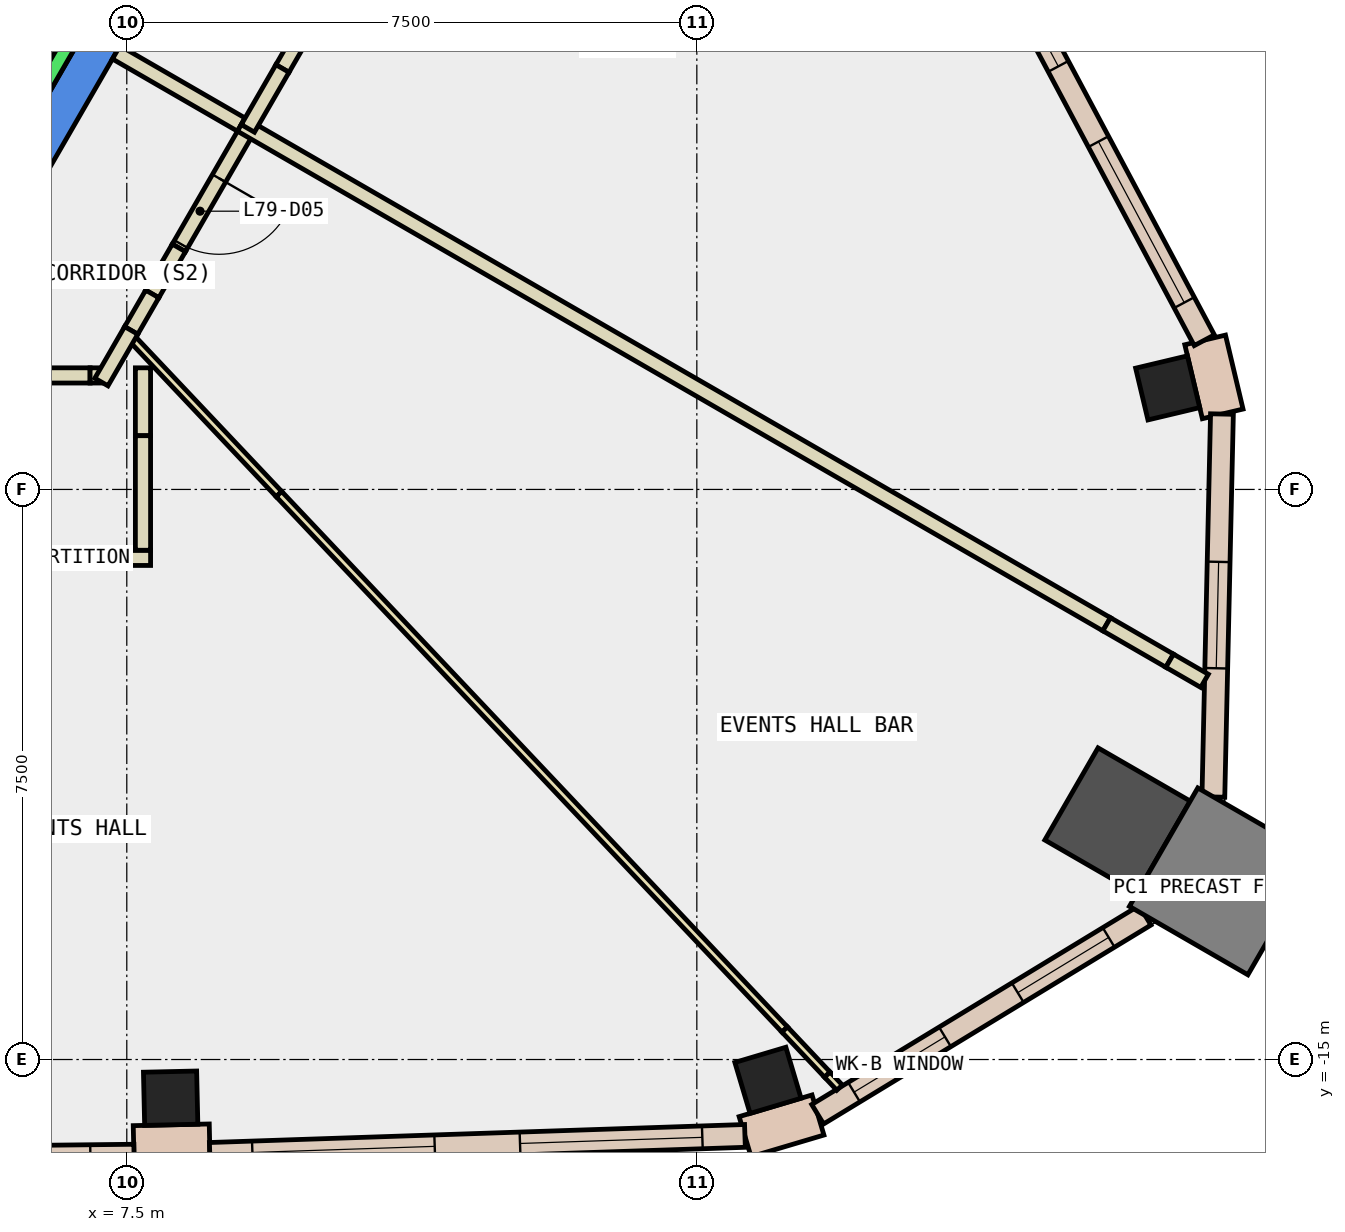
"""IFC4 building model, lengths in metres.
Left out: names, types, materials, properties, quantities, classifications, styles, units other than length and angle.
Written with IfcOpenShell. Run it as: python <this file> out.ifc"""

import sys

from ifc_helpers import new_model, si_unit, direction, frame, frame_2d, origin, origin_2d, place, context, subcontext, project, spatial, polyline, rectangle, outline, extrude, element, fill, save


model = new_model("IFC4")
c1 = context("Model", 3, precision=1e-05, world=origin(), true_north=direction((0.0, 1.0)))
c2 = subcontext(c1, "Body", "Model", "MODEL_VIEW")
j1 = project(units=[si_unit("LENGTHUNIT", "METRE"), si_unit("PLANEANGLEUNIT", "RADIAN")], contexts=[c1])
p1 = place(None, origin())
s1 = spatial("IfcSite", under=j1, at=p1, CompositionType="ELEMENT")
p2 = place(p1, origin())
s2 = spatial("IfcBuilding", under=s1, at=p2, CompositionType="ELEMENT")
p3 = place(p2, frame((0.0, 0.0, 335.9)))
s3 = spatial("IfcBuildingStorey", under=s2, at=p3, CompositionType="ELEMENT", Elevation=335.9)
for number, where, z_axis, x_axis in (
    (1, (8.077, -15.509, -0.35), (0.0, 0.0, 1.0), (1.0, 0.022, 0.0)),
    (2, (15.936, -15.274, -0.35), (0.0, 0.0, 1.0), (0.958, 0.286, 0.0)),
):
    element("IfcColumn", number, at=place(p3, frame(where, z_axis=z_axis, x_axis=x_axis)), inside=s3, PredefinedType="COLUMN", context=c2, shape_type="SweptSolid", body=[
        extrude(rectangle(XDim=0.7, YDim=0.7, at=origin_2d()), origin(), (0.0, 0.0, 1.0), 4.4),
    ])
p4 = place(p3, frame((20.535, -11.856, -0.35), z_axis=(0.0, 0.0, 1.0), x_axis=(-0.866025403784, 0.5, 0.0)))
e3 = element("IfcColumn", 3, at=p4, inside=s3, PredefinedType="COLUMN", context=c2, shape_type="SweptSolid", body=[
    extrude(rectangle(XDim=1.4, YDim=1.4, at=origin_2d()), origin(), (0.0, 0.0, 1.0), 4.4),
])
p5 = place(p3, frame((21.195, -6.164, -0.35), z_axis=(0.0, 0.0, 1.0), x_axis=(-0.2316120761, 0.972808226839, 0.0)))
e4 = element("IfcColumn", 4, at=p5, inside=s3, PredefinedType="COLUMN", context=c2, shape_type="SweptSolid", body=[
    extrude(rectangle(XDim=0.7, YDim=0.7, at=origin_2d()), origin(), (0.0, 0.0, 1.0), 4.4),
])
p6 = place(p3, frame((21.921, -12.656, -0.35), z_axis=(0.0, 0.0, 1.0), x_axis=(-0.866025403784, 0.5, 0.0)))
e5 = element("IfcColumn", 5, at=p6, inside=s3, PredefinedType="COLUMN", context=c2, shape_type="SweptSolid", body=[
    extrude(rectangle(XDim=1.8, YDim=1.8, at=origin_2d()), origin(), (0.0, 0.0, 1.0), 4.4),
])
p7 = place(p3, frame((0.0, 0.0, -0.35)))
e6 = element("IfcWall", 6, at=p7, inside=s3, PredefinedType="SHEAR", context=c2, shape_type="SweptSolid", body=[
    extrude(outline(polyline([(4.907, -6.0), (9.815, 2.5), (9.238, 2.5), (4.619, -5.5), (4.907, -6.0)])), origin(), (0.0, 0.0, 1.0), 4.4),
])
for number, where, z_axis, x_axis in (
    (7, (21.919, -6.506, 0.0), (0.0, 0.0, 1.0), (-0.231, 0.973, 0.0)),
    (8, (7.591, -16.145, 0.0), (0.0, 0.0, 1.0), (1.0, 0.022, 0.0)),
):
    element("IfcWall", number, at=place(p3, frame(where, z_axis=z_axis, x_axis=x_axis)), inside=s3, PredefinedType="STANDARD", context=c2, shape_type="SweptSolid", body=[
        extrude(rectangle(XDim=1.0, YDim=0.55, at=frame_2d((0.5, 0.0))), origin(), (0.0, 0.0, 1.0), 4.05),
    ])
p8 = place(p3, frame((15.635, -16.015, 0.0), z_axis=(0.0, 0.0, 1.0), x_axis=(0.958588587629, 0.284794521834, 0.0)))
e9 = element("IfcWall", 9, at=p8, inside=s3, PredefinedType="STANDARD", context=c2, shape_type="SweptSolid", body=[
    extrude(rectangle(XDim=1.0, YDim=0.55, at=frame_2d((0.5, 0.0))), origin(), (0.0, 0.0, 1.0), 4.05),
])
p9 = place(p3, frame((0.499, -16.344, 0.0), z_axis=(0.0, 0.0, 1.0), x_axis=(0.999937873213, 0.011146735624, 0.0)))
e10 = element("IfcWall", 10, at=p9, inside=s3, PredefinedType="STANDARD", context=c2, shape_type="SweptSolid", body=[
    extrude(rectangle(XDim=7.096, YDim=0.3, at=frame_2d((3.548, 0.0))), origin(), (0.0, 0.0, 1.0), 4.05),
])
p10 = place(p9, frame((0.574, 0.0, 0.9)))
e11 = element("IfcOpeningElement", 11, at=p10, cuts=e10, PredefinedType="OPENING", context=c2, shape_type="SweptSolid", body=[
    extrude(rectangle(XDim=2.4, YDim=3.0, at=frame_2d((1.2, 1.5))), frame((0.0, 0.16, 0.0), z_axis=(0.0, -1.0, 0.0), x_axis=(1.0, 0.0, 0.0)), (0.0, 0.0, 1.0), 0.32),
])
p11 = place(p9, frame((4.122, 0.0, 0.9)))
e12 = element("IfcOpeningElement", 12, at=p11, cuts=e10, PredefinedType="OPENING", context=c2, shape_type="SweptSolid", body=[
    extrude(rectangle(XDim=2.4, YDim=3.0, at=frame_2d((1.2, 1.5))), frame((0.0, 0.16, 0.0), z_axis=(0.0, -1.0, 0.0), x_axis=(1.0, 0.0, 0.0)), (0.0, 0.0, 1.0), 0.32),
])
p12 = place(p3, frame((8.592, -16.242, 0.0), z_axis=(0.0, 0.0, 1.0), x_axis=(0.999433696929, 0.033649449366, 0.0)))
e13 = element("IfcWall", 13, at=p12, inside=s3, PredefinedType="STANDARD", context=c2, shape_type="SweptSolid", body=[
    extrude(rectangle(XDim=7.045, YDim=0.3, at=frame_2d((3.522, 0.0))), origin(), (0.0, 0.0, 1.0), 4.05),
])
p13 = place(p12, frame((0.561, 0.0, 0.9)))
e14 = element("IfcOpeningElement", 14, at=p13, cuts=e13, PredefinedType="OPENING", context=c2, shape_type="SweptSolid", body=[
    extrude(rectangle(XDim=2.4, YDim=3.0, at=frame_2d((1.2, 1.5))), frame((0.0, 0.16, 0.0), z_axis=(0.0, -1.0, 0.0), x_axis=(1.0, 0.0, 0.0)), (0.0, 0.0, 1.0), 0.32),
])
p14 = place(p12, frame((4.084, 0.0, 0.9)))
e15 = element("IfcOpeningElement", 15, at=p14, cuts=e13, PredefinedType="OPENING", context=c2, shape_type="SweptSolid", body=[
    extrude(rectangle(XDim=2.4, YDim=3.0, at=frame_2d((1.2, 1.5))), frame((0.0, 0.16, 0.0), z_axis=(0.0, -1.0, 0.0), x_axis=(1.0, 0.0, 0.0)), (0.0, 0.0, 1.0), 0.32),
])
p15 = place(p3, frame((16.59, -15.72, 0.0), z_axis=(0.0, 0.0, 1.0), x_axis=(0.854607095238, 0.519275180197, 0.0)))
e16 = element("IfcWall", 16, at=p15, inside=s3, PredefinedType="STANDARD", context=c2, shape_type="SweptSolid", body=[
    extrude(rectangle(XDim=5.04, YDim=0.3, at=frame_2d((2.52, 0.0))), origin(), (0.0, 0.0, 1.0), 4.05),
])
p16 = place(p15, frame((0.56, 0.0, 0.9)))
e17 = element("IfcOpeningElement", 17, at=p16, cuts=e16, PredefinedType="OPENING", context=c2, shape_type="SweptSolid", body=[
    extrude(rectangle(XDim=1.4, YDim=3.0, at=frame_2d((0.7, 1.5))), frame((0.0, 0.16, 0.0), z_axis=(0.0, -1.0, 0.0), x_axis=(1.0, 0.0, 0.0)), (0.0, 0.0, 1.0), 0.32),
])
p17 = place(p15, frame((3.08, 0.0, 0.9)))
e18 = element("IfcOpeningElement", 18, at=p17, cuts=e16, PredefinedType="OPENING", context=c2, shape_type="SweptSolid", body=[
    extrude(rectangle(XDim=1.4, YDim=3.0, at=frame_2d((0.7, 1.5))), frame((0.0, 0.16, 0.0), z_axis=(0.0, -1.0, 0.0), x_axis=(1.0, 0.0, 0.0)), (0.0, 0.0, 1.0), 0.32),
])
p18 = place(p3, frame((21.796, -11.546, 0.0), z_axis=(0.0, 0.0, 1.0), x_axis=(0.022431960078, 0.999748371925, 0.0)))
e19 = element("IfcWall", 19, at=p18, inside=s3, PredefinedType="STANDARD", context=c2, shape_type="SweptSolid", body=[
    extrude(rectangle(XDim=5.039, YDim=0.3, at=frame_2d((2.52, 0.0))), origin(), (0.0, 0.0, 1.0), 4.05),
])
p19 = place(p18, frame((1.694, 0.0, 0.9)))
e20 = element("IfcOpeningElement", 20, at=p19, cuts=e19, PredefinedType="OPENING", context=c2, shape_type="SweptSolid", body=[
    extrude(rectangle(XDim=1.4, YDim=3.0, at=frame_2d((0.7, 1.5))), frame((0.0, 0.16, 0.0), z_axis=(0.0, -1.0, 0.0), x_axis=(1.0, 0.0, 0.0)), (0.0, 0.0, 1.0), 0.32),
])
p20 = place(p3, frame((21.677, -5.537, 0.0), z_axis=(0.0, 0.0, 1.0), x_axis=(-0.470447918342, 0.882427762555, 0.0)))
e21 = element("IfcWall", 21, at=p20, inside=s3, PredefinedType="STANDARD", context=c2, shape_type="SweptSolid", body=[
    extrude(rectangle(XDim=7.044, YDim=0.3, at=frame_2d((3.522, 0.0))), origin(), (0.0, 0.0, 1.0), 4.05),
])
p21 = place(p20, frame((0.561, 0.0, 0.9)))
e22 = element("IfcOpeningElement", 22, at=p21, cuts=e21, PredefinedType="OPENING", context=c2, shape_type="SweptSolid", body=[
    extrude(rectangle(XDim=2.4, YDim=3.0, at=frame_2d((1.2, 1.5))), frame((0.0, 0.16, 0.0), z_axis=(0.0, -1.0, 0.0), x_axis=(1.0, 0.0, 0.0)), (0.0, 0.0, 1.0), 0.32),
])
p22 = place(p20, frame((4.083, 0.0, 0.9)))
e23 = element("IfcOpeningElement", 23, at=p22, cuts=e21, PredefinedType="OPENING", context=c2, shape_type="SweptSolid", body=[
    extrude(rectangle(XDim=2.4, YDim=3.0, at=frame_2d((1.2, 1.5))), frame((0.0, 0.16, 0.0), z_axis=(0.0, -1.0, 0.0), x_axis=(1.0, 0.0, 0.0)), (0.0, 0.0, 1.0), 0.32),
])
p23 = place(p3, frame((7.813, -8.4, 0.0), z_axis=(0.0, 0.0, 1.0), x_axis=(-1.0, 0.0, 0.0)))
e24 = element("IfcWall", 24, at=p23, inside=s3, PredefinedType="PARTITIONING", context=c2, shape_type="SweptSolid", body=[
    extrude(rectangle(XDim=2.528, YDim=0.2, at=frame_2d((1.264, 0.0))), origin(), (0.0, 0.0, 1.0), 4.05),
])
p24 = place(p3, frame((7.713, -5.9, 0.0), z_axis=(0.0, 0.0, 1.0), x_axis=(0.0, -1.0, 0.0)))
e25 = element("IfcWall", 25, at=p24, inside=s3, PredefinedType="PARTITIONING", context=c2, shape_type="SweptSolid", body=[
    extrude(rectangle(XDim=0.893, YDim=0.2, at=frame_2d((0.447, 0.0))), origin(), (0.0, 0.0, 1.0), 1.95),
])
p25 = place(p3, frame((9.093, -2.75, 0.0), z_axis=(0.0, 0.0, 1.0), x_axis=(-0.500145398563, -0.865941441609, 0.0)))
e26 = element("IfcWall", 26, at=p25, inside=s3, PredefinedType="PARTITIONING", context=c2, shape_type="SweptSolid", body=[
    extrude(rectangle(XDim=1.815, YDim=0.2, at=frame_2d((0.908, 0.0))), origin(), (0.0, 0.0, 1.0), 4.05),
])
p26 = place(p25, frame((0.758, 0.0, 0.0)))
e27 = element("IfcOpeningElement", 27, at=p26, cuts=e26, PredefinedType="OPENING", context=c2, shape_type="SweptSolid", body=[
    extrude(rectangle(XDim=1.0, YDim=2.1, at=frame_2d((0.5, 1.05))), frame((0.0, 0.11, 0.0), z_axis=(0.0, -1.0, 0.0), x_axis=(1.0, 0.0, 0.0)), (0.0, 0.0, 1.0), 0.22),
])
p27 = place(p3, frame((7.361, -1.75, 0.0), z_axis=(0.0, 0.0, 1.0), x_axis=(0.865980106173, -0.500078449558, 0.0)))
e28 = element("IfcWall", 28, at=p27, inside=s3, PredefinedType="PARTITIONING", context=c2, shape_type="SweptSolid", body=[
    extrude(rectangle(XDim=1.9, YDim=0.2, at=frame_2d((0.95, 0.0))), origin(), (0.0, 0.0, 1.0), 4.05),
])
p28 = place(p3, frame((7.524, -5.467, 0.0), z_axis=(0.0, 0.0, 1.0), x_axis=(0.686690726235, -0.726949686363, 0.0)))
e29 = element("IfcWall", 29, at=p28, inside=s3, PredefinedType="PARTITIONING", context=c2, shape_type="SweptSolid", body=[
    extrude(rectangle(XDim=2.881, YDim=0.1, at=frame_2d((1.44, 0.0))), origin(), (0.0, 0.0, 1.0), 1.95),
])
p29 = place(p3, frame((9.006, -2.7, 0.0), z_axis=(0.0, 0.0, 1.0), x_axis=(0.86601643423, -0.500015535402, 0.0)))
e30 = element("IfcWall", 30, at=p29, inside=s3, PredefinedType="PARTITIONING", context=c2, shape_type="SweptSolid", body=[
    extrude(rectangle(XDim=13.147, YDim=0.2, at=frame_2d((6.574, 0.0))), origin(), (0.0, 0.0, 1.0), 4.05),
])
p30 = place(p3, frame((5.076, -6.0, 0.0), z_axis=(0.0, 0.0, 1.0), x_axis=(1.0, 0.0, 0.0)))
e31 = element("IfcWall", 31, at=p30, inside=s3, PredefinedType="PARTITIONING", context=c2, shape_type="SweptSolid", body=[
    extrude(rectangle(XDim=1.941, YDim=0.2, at=frame_2d((0.971, 0.0))), origin(), (0.0, 0.0, 1.0), 4.05),
])
p31 = place(p30, frame((0.336, 0.0, 0.0)))
e32 = element("IfcOpeningElement", 32, at=p31, cuts=e31, PredefinedType="OPENING", context=c2, shape_type="SweptSolid", body=[
    extrude(rectangle(XDim=1.0, YDim=2.1, at=frame_2d((0.5, 1.05))), frame((0.0, 0.11, 0.0), z_axis=(0.0, -1.0, 0.0), x_axis=(1.0, 0.0, 0.0)), (0.0, 0.0, 1.0), 0.22),
])
p32 = place(p3, frame((7.017, -6.0, 0.0), z_axis=(0.0, 0.0, 1.0), x_axis=(1.0, 0.0, 0.0)))
e33 = element("IfcWall", 33, at=p32, inside=s3, PredefinedType="PARTITIONING", context=c2, shape_type="SweptSolid", body=[
    extrude(rectangle(XDim=0.144, YDim=0.2, at=frame_2d((0.072, 0.0))), origin(), (0.0, 0.0, 1.0), 1.95),
])
p33 = place(p3, frame((7.713, -6.793, 0.0), z_axis=(0.0, 0.0, 1.0), x_axis=(0.0, -1.0, 0.0)))
e34 = element("IfcWall", 34, at=p33, inside=s3, PredefinedType="PARTITIONING", context=c2, shape_type="SweptSolid", body=[
    extrude(rectangle(XDim=1.507, YDim=0.2, at=frame_2d((0.753, 0.0))), origin(), (0.0, 0.0, 1.0), 4.05),
])
p34 = place(p3, frame((8.185, -4.322, 0.0), z_axis=(0.0, 0.0, 1.0), x_axis=(-0.500265973451, -0.865871789474, 0.0)))
e35 = element("IfcWall", 35, at=p34, inside=s3, PredefinedType="PARTITIONING", context=c2, shape_type="SweptSolid", body=[
    extrude(rectangle(XDim=0.7, YDim=0.2, at=frame_2d((0.35, 0.0))), origin(), (0.0, 0.0, 1.0), 1.95),
])
p35 = place(p3, frame((7.835, -4.928, 0.0), z_axis=(0.0, 0.0, 1.0), x_axis=(-0.499646164767, -0.866229594296, 0.0)))
e36 = element("IfcWall", 36, at=p35, inside=s3, PredefinedType="PARTITIONING", context=c2, shape_type="SweptSolid", body=[
    extrude(rectangle(XDim=0.554, YDim=0.2, at=frame_2d((0.277, 0.0))), origin(), (0.0, 0.0, 1.0), 4.05),
])
p36 = place(p3, frame((7.558, -5.408, 0.0), z_axis=(0.0, 0.0, 1.0), x_axis=(-0.500090821976, -0.865972961342, 0.0)))
e37 = element("IfcWall", 37, at=p36, inside=s3, PredefinedType="PARTITIONING", context=c2, shape_type="SweptSolid", body=[
    extrude(rectangle(XDim=0.784, YDim=0.2, at=frame_2d((0.392, 0.0))), origin(), (0.0, 0.0, 1.0), 1.95),
])
p37 = place(p3, frame((9.502, -7.561, 0.0), z_axis=(0.0, 0.0, 1.0), x_axis=(0.686701951344, -0.726939082744, 0.0)))
e38 = element("IfcWall", 38, at=p37, inside=s3, PredefinedType="PARTITIONING", context=c2, shape_type="SweptSolid", body=[
    extrude(rectangle(XDim=9.69, YDim=0.1, at=frame_2d((4.845, 0.0))), origin(), (0.0, 0.0, 1.0), 4.05),
])
p38 = place(p3, frame((16.156, -14.605, 0.0), z_axis=(0.0, 0.0, 1.0), x_axis=(0.686649854496, -0.726988292423, 0.0)))
e39 = element("IfcWall", 39, at=p38, inside=s3, PredefinedType="PARTITIONING", context=c2, shape_type="SweptSolid", body=[
    extrude(rectangle(XDim=0.817, YDim=0.1, at=frame_2d((0.409, 0.0))), origin(), (0.0, 0.0, 1.0), 1.95),
])
p39 = place(p3, frame((16.717, -15.199, 0.0), z_axis=(0.0, 0.0, 1.0), x_axis=(0.684943115963, -0.728596546722, 0.0)))
e40 = element("IfcWall", 40, at=p39, inside=s3, PredefinedType="PARTITIONING", context=c2, shape_type="SweptSolid", body=[
    extrude(rectangle(XDim=0.235, YDim=0.1, at=frame_2d((0.117, 0.0))), origin(), (0.0, 0.0, 1.0), 4.05),
])
p40 = place(p3, frame((20.392, -9.274, 0.0), z_axis=(0.0, 0.0, 1.0), x_axis=(0.865815970987, -0.500362572924, 0.0)))
e41 = element("IfcWall", 41, at=p40, inside=s3, PredefinedType="PARTITIONING", context=c2, shape_type="SweptSolid", body=[
    extrude(rectangle(XDim=0.957, YDim=0.2, at=frame_2d((0.479, 0.0))), origin(), (0.0, 0.0, 1.0), 1.95),
])
p41 = place(p3, frame((21.221, -9.753, 0.0), z_axis=(0.0, 0.0, 1.0), x_axis=(0.865909406545, -0.500200859313, 0.0)))
e42 = element("IfcWall", 42, at=p41, inside=s3, PredefinedType="PARTITIONING", context=c2, shape_type="SweptSolid", body=[
    extrude(rectangle(XDim=0.53, YDim=0.2, at=frame_2d((0.265, 0.0))), origin(), (0.0, 0.0, 1.0), 4.05),
])
p42 = place(p3, frame((9.913, -1.331, 0.0), z_axis=(0.0, 0.0, 1.0), x_axis=(-0.500785366854, -0.865571496957, 0.0)))
e43 = element("IfcWall", 43, at=p42, inside=s3, PredefinedType="PARTITIONING", context=c2, shape_type="SweptSolid", body=[
    extrude(rectangle(XDim=0.729, YDim=0.2, at=frame_2d((0.364, 0.0))), origin(), (0.0, 0.0, 1.0), 1.95),
])
p43 = place(p3, frame((9.548, -1.962, 0.0), z_axis=(0.0, 0.0, 1.0), x_axis=(-0.500063042646, -0.865989003036, 0.0)))
e44 = element("IfcWall", 44, at=p43, inside=s3, PredefinedType="PARTITIONING", context=c2, shape_type="SweptSolid", body=[
    extrude(rectangle(XDim=0.91, YDim=0.2, at=frame_2d((0.455, 0.0))), origin(), (0.0, 0.0, 1.0), 4.05),
])
p44 = place(p3, frame((5.492, -3.788, 0.0), z_axis=(0.0, 0.0, 1.0), x_axis=(0.500034260056, 0.866005622828, 0.0)))
e45 = element("IfcWall", 45, at=p44, inside=s3, PredefinedType="STANDARD", context=c2, shape_type="SweptSolid", body=[
    extrude(rectangle(XDim=5.399, YDim=0.2, at=frame_2d((2.7, 0.0))), origin(), (0.0, 0.0, 1.0), 4.05),
])
p45 = place(p13, origin())
e46 = element("IfcWindow", 46, at=p45, inside=s3, PartitioningType="SINGLE_PANEL", PredefinedType="WINDOW", context=c2, shape_type="SweptSolid", body=[
    extrude(rectangle(XDim=2.4, YDim=3.0, at=frame_2d((1.2, 1.5))), frame((0.0, 0.03, 0.0), z_axis=(0.0, -1.0, 0.0), x_axis=(1.0, 0.0, 0.0)), (0.0, 0.0, 1.0), 0.06),
])
fill(e14, e46)
p46 = place(p14, origin())
e47 = element("IfcWindow", 47, at=p46, inside=s3, PartitioningType="SINGLE_PANEL", PredefinedType="WINDOW", context=c2, shape_type="SweptSolid", body=[
    extrude(rectangle(XDim=2.4, YDim=3.0, at=frame_2d((1.2, 1.5))), frame((0.0, 0.03, 0.0), z_axis=(0.0, -1.0, 0.0), x_axis=(1.0, 0.0, 0.0)), (0.0, 0.0, 1.0), 0.06),
])
fill(e15, e47)
p47 = place(p16, origin())
e48 = element("IfcWindow", 48, at=p47, inside=s3, PartitioningType="SINGLE_PANEL", PredefinedType="WINDOW", context=c2, shape_type="SweptSolid", body=[
    extrude(rectangle(XDim=1.4, YDim=3.0, at=frame_2d((0.7, 1.5))), frame((0.0, 0.03, 0.0), z_axis=(0.0, -1.0, 0.0), x_axis=(1.0, 0.0, 0.0)), (0.0, 0.0, 1.0), 0.06),
])
fill(e17, e48)
p48 = place(p17, origin())
e49 = element("IfcWindow", 49, at=p48, inside=s3, PartitioningType="SINGLE_PANEL", PredefinedType="WINDOW", context=c2, shape_type="SweptSolid", body=[
    extrude(rectangle(XDim=1.4, YDim=3.0, at=frame_2d((0.7, 1.5))), frame((0.0, 0.03, 0.0), z_axis=(0.0, -1.0, 0.0), x_axis=(1.0, 0.0, 0.0)), (0.0, 0.0, 1.0), 0.06),
])
fill(e18, e49)
p49 = place(p19, origin())
e50 = element("IfcWindow", 50, at=p49, inside=s3, PartitioningType="SINGLE_PANEL", PredefinedType="WINDOW", context=c2, shape_type="SweptSolid", body=[
    extrude(rectangle(XDim=1.4, YDim=3.0, at=frame_2d((0.7, 1.5))), frame((0.0, 0.03, 0.0), z_axis=(0.0, -1.0, 0.0), x_axis=(1.0, 0.0, 0.0)), (0.0, 0.0, 1.0), 0.06),
])
fill(e20, e50)
p50 = place(p21, origin())
e51 = element("IfcWindow", 51, at=p50, inside=s3, PartitioningType="SINGLE_PANEL", PredefinedType="WINDOW", context=c2, shape_type="SweptSolid", body=[
    extrude(rectangle(XDim=2.4, YDim=3.0, at=frame_2d((1.2, 1.5))), frame((0.0, 0.03, 0.0), z_axis=(0.0, -1.0, 0.0), x_axis=(1.0, 0.0, 0.0)), (0.0, 0.0, 1.0), 0.06),
])
fill(e22, e51)
p51 = place(p22, origin())
e52 = element("IfcWindow", 52, at=p51, inside=s3, PartitioningType="SINGLE_PANEL", PredefinedType="WINDOW", context=c2, shape_type="SweptSolid", body=[
    extrude(rectangle(XDim=2.4, YDim=3.0, at=frame_2d((1.2, 1.5))), frame((0.0, 0.03, 0.0), z_axis=(0.0, -1.0, 0.0), x_axis=(1.0, 0.0, 0.0)), (0.0, 0.0, 1.0), 0.06),
])
fill(e23, e52)
p52 = place(p26, origin())
e53 = element("IfcDoor", 53, at=p52, inside=s3, OperationType="SINGLE_SWING_LEFT", PredefinedType="DOOR", context=c2, shape_type="SweptSolid", body=[
    extrude(rectangle(XDim=1.0, YDim=2.1, at=frame_2d((0.5, 1.05))), frame((0.0, 0.025, 0.0), z_axis=(0.0, -1.0, 0.0), x_axis=(1.0, 0.0, 0.0)), (0.0, 0.0, 1.0), 0.05),
])
fill(e27, e53)
save(model, sys.argv[1])
